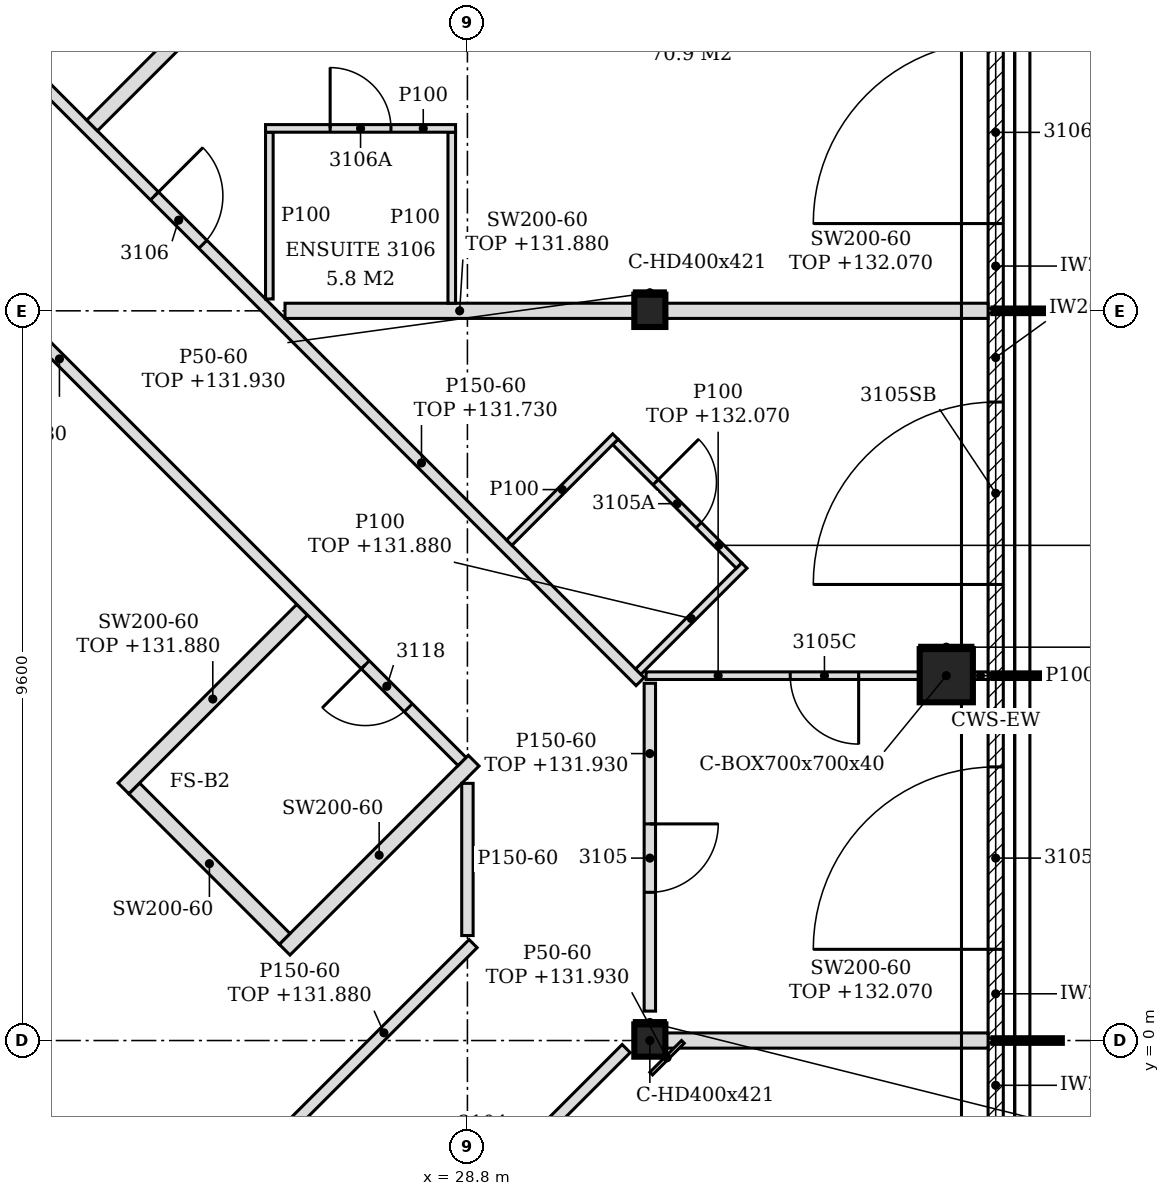
"""IFC4 building model, lengths in metres.
Left out: names, types, materials, properties, quantities, classifications, styles, units other than length and angle.
Written with IfcOpenShell. Run it as: python <this file> out.ifc"""

import sys

from ifc_helpers import new_model, si_unit, direction, frame, frame_2d, origin, origin_2d, place, context, subcontext, project, spatial, polyline, rectangle, hollow_rectangle, i_section, outline, extrude, element, fill, save


model = new_model("IFC4")
c1 = context("Model", 3, precision=1e-05, world=origin(), true_north=direction((0.0, 1.0)))
c2 = subcontext(c1, "Body", "Model", "MODEL_VIEW")
j1 = project(units=[si_unit("LENGTHUNIT", "METRE"), si_unit("PLANEANGLEUNIT", "RADIAN")], contexts=[c1])
p1 = place(None, origin())
s1 = spatial("IfcSite", under=j1, at=p1, CompositionType="ELEMENT")
p2 = place(p1, origin())
s2 = spatial("IfcBuilding", under=s1, at=p2, CompositionType="ELEMENT")
p3 = place(p2, frame((0.0, 0.0, 129.0)))
s3 = spatial("IfcBuildingStorey", under=s2, at=p3, CompositionType="ELEMENT", Elevation=129.0)
p4 = place(p3, frame((35.1, 4.8, -0.15), z_axis=(0.0, 0.0, 1.0), x_axis=(1.0, 0.0, 0.0)))
e1 = element("IfcColumn", 1, at=p4, inside=s3, PredefinedType="COLUMN", context=c2, shape_type="SweptSolid", body=[
    extrude(hollow_rectangle(XDim=0.7, YDim=0.7, WallThickness=0.04, at=origin_2d()), origin(), (0.0, 0.0, 1.0), 3.6),
])
for number, where, z_axis, x_axis in (
    (2, (31.2, 0.0, -0.15), (0.0, 0.0, 1.0), (1.0, 0.0, 0.0)),
    (3, (31.2, 9.6, -0.15), (0.0, 0.0, 1.0), (1.0, 0.0, 0.0)),
):
    element("IfcColumn", number, at=place(p3, frame(where, z_axis=z_axis, x_axis=x_axis)), inside=s3, PredefinedType="COLUMN", context=c2, shape_type="SweptSolid", body=[
        extrude(i_section(OverallWidth=0.409, OverallDepth=0.425, WebThickness=0.033, FlangeThickness=0.052, FilletRadius=0.015, at=origin_2d()), origin(), (0.0, 0.0, 1.0), 3.6),
    ])
p5 = place(p3, frame((35.75, -4.656, 0.0), z_axis=(0.0, 0.0, 1.0), x_axis=(0.0, 1.0, 0.0)))
e4 = element("IfcWall", 4, at=p5, inside=s3, PredefinedType="NOTDEFINED", context=c2, shape_type="SweptSolid", body=[
    extrude(rectangle(XDim=4.626, YDim=0.2, at=frame_2d((2.313, 0.0))), origin(), (0.0, 0.0, 1.0), 3.45),
])
p6 = place(p5, frame((1.108, 0.0, 0.0)))
e5 = element("IfcOpeningElement", 5, at=p6, cuts=e4, PredefinedType="OPENING", context=c2, shape_type="SweptSolid", body=[
    extrude(rectangle(XDim=2.4, YDim=2.4, at=frame_2d((1.2, 1.2))), frame((0.0, 0.11, 0.0), z_axis=(0.0, -1.0, 0.0), x_axis=(1.0, 0.0, 0.0)), (0.0, 0.0, 1.0), 0.22),
])
p7 = place(p3, frame((35.75, 0.03, 0.0), z_axis=(0.0, 0.0, 1.0), x_axis=(0.0, 1.0, 0.0)))
e6 = element("IfcWall", 6, at=p7, inside=s3, PredefinedType="NOTDEFINED", context=c2, shape_type="SweptSolid", body=[
    extrude(rectangle(XDim=4.74, YDim=0.2, at=frame_2d((2.37, 0.0))), origin(), (0.0, 0.0, 1.0), 3.45),
])
p8 = place(p7, frame((1.17, 0.0, 0.0)))
e7 = element("IfcOpeningElement", 7, at=p8, cuts=e6, PredefinedType="OPENING", context=c2, shape_type="SweptSolid", body=[
    extrude(rectangle(XDim=2.4, YDim=2.4, at=frame_2d((1.2, 1.2))), frame((0.0, 0.11, 0.0), z_axis=(0.0, -1.0, 0.0), x_axis=(1.0, 0.0, 0.0)), (0.0, 0.0, 1.0), 0.22),
])
p9 = place(p3, frame((35.75, 4.83, 0.0), z_axis=(0.0, 0.0, 1.0), x_axis=(0.0, 1.0, 0.0)))
e8 = element("IfcWall", 8, at=p9, inside=s3, PredefinedType="NOTDEFINED", context=c2, shape_type="SweptSolid", body=[
    extrude(rectangle(XDim=4.74, YDim=0.2, at=frame_2d((2.37, 0.0))), origin(), (0.0, 0.0, 1.0), 3.45),
])
p10 = place(p9, frame((1.17, 0.0, 0.0)))
e9 = element("IfcOpeningElement", 9, at=p10, cuts=e8, PredefinedType="OPENING", context=c2, shape_type="SweptSolid", body=[
    extrude(rectangle(XDim=2.4, YDim=2.4, at=frame_2d((1.2, 1.2))), frame((0.0, 0.11, 0.0), z_axis=(0.0, -1.0, 0.0), x_axis=(1.0, 0.0, 0.0)), (0.0, 0.0, 1.0), 0.22),
])
p11 = place(p3, frame((35.75, 9.63, 0.0), z_axis=(0.0, 0.0, 1.0), x_axis=(0.0, 1.0, 0.0)))
e10 = element("IfcWall", 10, at=p11, inside=s3, PredefinedType="NOTDEFINED", context=c2, shape_type="SweptSolid", body=[
    extrude(rectangle(XDim=4.626, YDim=0.2, at=frame_2d((2.313, 0.0))), origin(), (0.0, 0.0, 1.0), 3.45),
])
p12 = place(p11, frame((1.118, 0.0, 0.0)))
e11 = element("IfcOpeningElement", 11, at=p12, cuts=e10, PredefinedType="OPENING", context=c2, shape_type="SweptSolid", body=[
    extrude(rectangle(XDim=2.4, YDim=2.4, at=frame_2d((1.2, 1.2))), frame((0.0, 0.11, 0.0), z_axis=(0.0, -1.0, 0.0), x_axis=(1.0, 0.0, 0.0)), (0.0, 0.0, 1.0), 0.22),
])
p13 = place(p3, frame((22.722, -8.272, 0.0), z_axis=(0.0, 0.0, 1.0), x_axis=(0.707106781187, 0.707106781187, 0.0)))
e12 = element("IfcWall", 12, at=p13, inside=s3, PredefinedType="PARTITIONING", context=c2, shape_type="SweptSolid", body=[
    extrude(rectangle(XDim=11.549, YDim=0.15, at=frame_2d((5.774, 0.0))), origin(), (0.0, 0.0, 1.0), 2.88),
])
p14 = place(p13, frame((1.925, 0.0, 0.0)))
e13 = element("IfcOpeningElement", 13, at=p14, cuts=e12, PredefinedType="OPENING", context=c2, shape_type="SweptSolid", body=[
    extrude(rectangle(XDim=0.9, YDim=2.1, at=frame_2d((0.45, 1.05))), frame((0.0, 0.085, 0.0), z_axis=(0.0, -1.0, 0.0), x_axis=(1.0, 0.0, 0.0)), (0.0, 0.0, 1.0), 0.17),
])
p15 = place(p13, frame((9.065, 0.0, 0.0)))
e14 = element("IfcOpeningElement", 14, at=p15, cuts=e12, PredefinedType="OPENING", context=c2, shape_type="SweptSolid", body=[
    extrude(rectangle(XDim=0.9, YDim=2.1, at=frame_2d((0.45, 1.05))), frame((0.0, 0.085, 0.0), z_axis=(0.0, -1.0, 0.0), x_axis=(1.0, 0.0, 0.0)), (0.0, 0.0, 1.0), 0.17),
])
p16 = place(p3, frame((26.528, -1.072, 0.0), z_axis=(0.0, 0.0, 1.0), x_axis=(0.707106781187, 0.707106781187, 0.0)))
e15 = element("IfcWall", 15, at=p16, inside=s3, PredefinedType="PARTITIONING", context=c2, shape_type="SweptSolid", body=[
    extrude(rectangle(XDim=3.319, YDim=0.15, at=frame_2d((1.66, 0.0))), origin(), (0.0, 0.0, 1.0), 2.88),
])
p17 = place(p3, frame((31.405, 0.0, 0.0), z_axis=(0.0, 0.0, 1.0), x_axis=(1.0, 0.0, 0.0)))
e16 = element("IfcWall", 16, at=p17, inside=s3, PredefinedType="PARTITIONING", context=c2, shape_type="SweptSolid", body=[
    extrude(outline(polyline([(0.0, 0.0), (4.245, 0.0), (4.246, 3.07), (3.845, 3.07), (3.844, 2.93), (3.545, 2.93), (3.543, 3.07), (0.0, 3.07), (0.0, 0.0)])), frame((0.0, 0.1, 0.0), z_axis=(0.0, -1.0, 0.0), x_axis=(1.0, 0.0, 0.0)), (0.0, 0.0, 1.0), 0.2),
])
p18 = place(p3, frame((31.2, 0.387, 0.0), z_axis=(0.0, 0.0, 1.0), x_axis=(0.0, 1.0, 0.0)))
e17 = element("IfcWall", 17, at=p18, inside=s3, PredefinedType="PARTITIONING", context=c2, shape_type="SweptSolid", body=[
    extrude(rectangle(XDim=4.313, YDim=0.15, at=frame_2d((2.156, 0.0))), origin(), (0.0, 0.0, 1.0), 2.93),
])
p19 = place(p18, frame((1.563, 0.0, 0.0)))
e18 = element("IfcOpeningElement", 18, at=p19, cuts=e17, PredefinedType="OPENING", context=c2, shape_type="SweptSolid", body=[
    extrude(rectangle(XDim=0.9, YDim=2.1, at=frame_2d((0.45, 1.05))), frame((0.0, 0.085, 0.0), z_axis=(0.0, -1.0, 0.0), x_axis=(1.0, 0.0, 0.0)), (0.0, 0.0, 1.0), 0.17),
])
p20 = place(p3, frame((26.395, 1.195, 0.0), z_axis=(0.0, 0.0, 1.0), x_axis=(0.707106781187, 0.707106781187, 0.0)))
e19 = element("IfcWall", 19, at=p20, inside=s3, PredefinedType="PARTITIONING", context=c2, shape_type="SweptSolid", body=[
    extrude(rectangle(XDim=3.517, YDim=0.2, at=frame_2d((1.759, 0.0))), origin(), (0.0, 0.0, 1.0), 3.45),
])
p21 = place(p3, frame((26.395, 1.337, 0.0), z_axis=(0.0, 0.0, 1.0), x_axis=(-0.706888787312, 0.707324707876, 0.0)))
e20 = element("IfcWall", 20, at=p21, inside=s3, PredefinedType="PARTITIONING", context=c2, shape_type="SweptSolid", body=[
    extrude(rectangle(XDim=2.8, YDim=0.2, at=frame_2d((1.4, 0.0))), origin(), (0.0, 0.0, 1.0), 3.45),
])
p22 = place(p3, frame((28.8, 1.381, 0.0), z_axis=(0.0, 0.0, 1.0), x_axis=(0.0, 1.0, 0.0)))
e21 = element("IfcWall", 21, at=p22, inside=s3, PredefinedType="PARTITIONING", context=c2, shape_type="SweptSolid", body=[
    extrude(rectangle(XDim=2.002, YDim=0.15, at=frame_2d((1.001, 0.0))), origin(), (0.0, 0.0, 1.0), 3.45),
])
p23 = place(p3, frame((24.274, 3.317, 0.0), z_axis=(0.0, 0.0, 1.0), x_axis=(0.707253620925, 0.706959910949, 0.0)))
e22 = element("IfcWall", 22, at=p23, inside=s3, PredefinedType="PARTITIONING", context=c2, shape_type="SweptSolid", body=[
    extrude(rectangle(XDim=3.325, YDim=0.2, at=frame_2d((1.663, 0.0))), origin(), (0.0, 0.0, 1.0), 2.88),
])
p24 = place(p3, frame((28.729, 3.671, 0.0), z_axis=(0.0, 0.0, 1.0), x_axis=(-0.707106781187, 0.707106781187, 0.0)))
e23 = element("IfcWall", 23, at=p24, inside=s3, PredefinedType="PARTITIONING", context=c2, shape_type="SweptSolid", body=[
    extrude(rectangle(XDim=13.182, YDim=0.15, at=frame_2d((6.591, 0.0))), origin(), (0.0, 0.0, 1.0), 2.88),
])
p25 = place(p24, frame((1.0, 0.0, 0.0)))
e24 = element("IfcOpeningElement", 24, at=p25, cuts=e23, PredefinedType="OPENING", context=c2, shape_type="SweptSolid", body=[
    extrude(rectangle(XDim=0.8, YDim=2.1, at=frame_2d((0.4, 1.05))), frame((0.0, 0.085, 0.0), z_axis=(0.0, -1.0, 0.0), x_axis=(1.0, 0.0, 0.0)), (0.0, 0.0, 1.0), 0.17),
])
p26 = place(p3, frame((31.072, 4.722, 0.0), z_axis=(0.0, 0.0, 1.0), x_axis=(-0.707106781187, 0.707106781187, 0.0)))
e25 = element("IfcWall", 25, at=p26, inside=s3, PredefinedType="PARTITIONING", context=c2, shape_type="SweptSolid", body=[
    extrude(rectangle(XDim=23.688, YDim=0.15, at=frame_2d((11.844, 0.0))), origin(), (0.0, 0.0, 1.0), 2.73),
])
p27 = place(p26, frame((8.135, 0.0, 0.0)))
e26 = element("IfcOpeningElement", 26, at=p27, cuts=e25, PredefinedType="OPENING", context=c2, shape_type="SweptSolid", body=[
    extrude(rectangle(XDim=0.9, YDim=2.1, at=frame_2d((0.45, 1.05))), frame((0.0, 0.085, 0.0), z_axis=(0.0, -1.0, 0.0), x_axis=(1.0, 0.0, 0.0)), (0.0, 0.0, 1.0), 0.17),
])
p28 = place(p26, frame((13.091, 0.0, 0.0)))
e27 = element("IfcOpeningElement", 27, at=p28, cuts=e25, PredefinedType="OPENING", context=c2, shape_type="SweptSolid", body=[
    extrude(rectangle(XDim=0.9, YDim=2.1, at=frame_2d((0.45, 1.05))), frame((0.0, 0.085, 0.0), z_axis=(0.0, -1.0, 0.0), x_axis=(1.0, 0.0, 0.0)), (0.0, 0.0, 1.0), 0.17),
])
p29 = place(p26, frame((18.69, 0.0, 0.0)))
e28 = element("IfcOpeningElement", 28, at=p29, cuts=e25, PredefinedType="OPENING", context=c2, shape_type="SweptSolid", body=[
    extrude(rectangle(XDim=0.9, YDim=2.1, at=frame_2d((0.45, 1.05))), frame((0.0, 0.085, 0.0), z_axis=(0.0, -1.0, 0.0), x_axis=(1.0, 0.0, 0.0)), (0.0, 0.0, 1.0), 0.17),
])
p30 = place(p3, frame((31.15, 4.8, 0.0), z_axis=(0.0, 0.0, 1.0), x_axis=(1.0, 0.0, 0.0)))
e29 = element("IfcWall", 29, at=p30, inside=s3, PredefinedType="PARTITIONING", context=c2, shape_type="SweptSolid", body=[
    extrude(outline(polyline([(0.0, 0.0), (3.6, 0.0), (3.6, 3.07), (0.2, 3.07), (0.198, 2.93), (0.0, 2.93), (0.0, 0.0)])), frame((0.0, 0.05, 0.0), z_axis=(0.0, -1.0, 0.0), x_axis=(1.0, 0.0, 0.0)), (0.0, 0.0, 1.0), 0.1),
])
p31 = place(p30, frame((1.897, 0.0, 0.0)))
e30 = element("IfcOpeningElement", 30, at=p31, cuts=e29, PredefinedType="OPENING", context=c2, shape_type="SweptSolid", body=[
    extrude(rectangle(XDim=0.9, YDim=2.1, at=frame_2d((0.45, 1.05))), frame((0.0, 0.06, 0.0), z_axis=(0.0, -1.0, 0.0), x_axis=(1.0, 0.0, 0.0)), (0.0, 0.0, 1.0), 0.12),
])
p32 = place(p3, frame((35.45, 4.8, 0.0), z_axis=(0.0, 0.0, 1.0), x_axis=(1.0, 0.0, 0.0)))
e31 = element("IfcWall", 31, at=p32, inside=s3, PredefinedType="PARTITIONING", context=c2, shape_type="SweptSolid", body=[
    extrude(rectangle(XDim=0.2, YDim=0.1, at=frame_2d((0.1, 0.0))), origin(), (0.0, 0.0, 1.0), 3.45),
])
p33 = place(p3, frame((31.047, 4.853, 0.0), z_axis=(0.0, 0.0, 1.0), x_axis=(0.707044963048, 0.707168593921, 0.0)))
e32 = element("IfcWall", 32, at=p33, inside=s3, PredefinedType="PARTITIONING", context=c2, shape_type="SweptSolid", body=[
    extrude(rectangle(XDim=1.975, YDim=0.1, at=frame_2d((0.987, 0.0))), origin(), (0.0, 0.0, 1.0), 2.88),
])
p34 = place(p3, frame((32.373, 6.25, 0.0), z_axis=(0.0, 0.0, 1.0), x_axis=(-0.707159861304, 0.707053697085, 0.0)))
e33 = element("IfcWall", 33, at=p34, inside=s3, PredefinedType="PARTITIONING", context=c2, shape_type="SweptSolid", body=[
    extrude(rectangle(XDim=2.3, YDim=0.1, at=frame_2d((1.15, 0.0))), origin(), (0.0, 0.0, 1.0), 2.93),
])
p35 = place(p34, frame((0.75, 0.0, 0.0)))
e34 = element("IfcOpeningElement", 34, at=p35, cuts=e33, PredefinedType="OPENING", context=c2, shape_type="SweptSolid", body=[
    extrude(rectangle(XDim=0.8, YDim=2.1, at=frame_2d((0.4, 1.05))), frame((0.0, 0.06, 0.0), z_axis=(0.0, -1.0, 0.0), x_axis=(1.0, 0.0, 0.0)), (0.0, 0.0, 1.0), 0.12),
])
p36 = place(p3, frame((29.35, 6.55, 0.0), z_axis=(0.0, 0.0, 1.0), x_axis=(0.707106781187, 0.707106781187, 0.0)))
e35 = element("IfcWall", 35, at=p36, inside=s3, PredefinedType="PARTITIONING", context=c2, shape_type="SweptSolid", body=[
    extrude(rectangle(XDim=1.975, YDim=0.1, at=frame_2d((0.987, 0.0))), origin(), (0.0, 0.0, 1.0), 3.45),
])
p37 = place(p3, frame((26.4, 9.6, 0.0), z_axis=(0.0, 0.0, 1.0), x_axis=(1.0, 0.0, 0.0)))
e36 = element("IfcWall", 36, at=p37, inside=s3, PredefinedType="PARTITIONING", context=c2, shape_type="SweptSolid", body=[
    extrude(rectangle(XDim=4.595, YDim=0.2, at=frame_2d((2.298, 0.0))), origin(), (0.0, 0.0, 1.0), 2.88),
])
p38 = place(p3, frame((31.405, 9.6, 0.0), z_axis=(0.0, 0.0, 1.0), x_axis=(1.0, 0.0, 0.0)))
e37 = element("IfcWall", 37, at=p38, inside=s3, PredefinedType="PARTITIONING", context=c2, shape_type="SweptSolid", body=[
    extrude(outline(polyline([(0.0, 0.0), (4.245, 0.0), (4.246, 3.07), (3.845, 3.07), (3.844, 2.93), (3.545, 2.93), (3.543, 3.07), (0.0, 3.07), (0.0, 0.0)])), frame((0.0, 0.1, 0.0), z_axis=(0.0, -1.0, 0.0), x_axis=(1.0, 0.0, 0.0)), (0.0, 0.0, 1.0), 0.2),
])
p39 = place(p3, frame((28.594, 9.7, 0.0), z_axis=(0.0, 0.0, 1.0), x_axis=(0.0, 1.0, 0.0)))
e38 = element("IfcWall", 38, at=p39, inside=s3, PredefinedType="PARTITIONING", context=c2, shape_type="SweptSolid", body=[
    extrude(outline(polyline([(0.0, 0.0), (2.25, 0.0), (2.25, 3.45), (0.005, 3.45), (0.003, 2.88), (0.0, 2.88), (0.0, 0.0)])), frame((0.0, 0.05, 0.0), z_axis=(0.0, -1.0, 0.0), x_axis=(1.0, 0.0, 0.0)), (0.0, 0.0, 1.0), 0.1),
])
p40 = place(p3, frame((26.194, 9.756, 0.0), z_axis=(0.0, 0.0, 1.0), x_axis=(0.0, 1.0, 0.0)))
e39 = element("IfcWall", 39, at=p40, inside=s3, PredefinedType="PARTITIONING", context=c2, shape_type="SweptSolid", body=[
    extrude(rectangle(XDim=2.194, YDim=0.1, at=frame_2d((1.097, 0.0))), origin(), (0.0, 0.0, 1.0), 3.45),
])
p41 = place(p3, frame((23.862, 12.038, 0.0), z_axis=(0.0, 0.0, 1.0), x_axis=(0.707106781187, 0.707106781187, 0.0)))
e40 = element("IfcWall", 40, at=p41, inside=s3, PredefinedType="PARTITIONING", context=c2, shape_type="SweptSolid", body=[
    extrude(rectangle(XDim=8.858, YDim=0.2, at=frame_2d((4.429, 0.0))), origin(), (0.0, 0.0, 1.0), 2.88),
])
p42 = place(p3, frame((26.144, 12.0, 0.0), z_axis=(0.0, 0.0, 1.0), x_axis=(1.0, 0.0, 0.0)))
e41 = element("IfcWall", 41, at=p42, inside=s3, PredefinedType="PARTITIONING", context=c2, shape_type="SweptSolid", body=[
    extrude(rectangle(XDim=2.5, YDim=0.1, at=frame_2d((1.25, 0.0))), origin(), (0.0, 0.0, 1.0), 3.45),
])
p43 = place(p42, frame((0.85, 0.0, 0.0)))
e42 = element("IfcOpeningElement", 42, at=p43, cuts=e41, PredefinedType="OPENING", context=c2, shape_type="SweptSolid", body=[
    extrude(rectangle(XDim=0.8, YDim=2.1, at=frame_2d((0.4, 1.05))), frame((0.0, 0.06, 0.0), z_axis=(0.0, -1.0, 0.0), x_axis=(1.0, 0.0, 0.0)), (0.0, 0.0, 1.0), 0.12),
])
p44 = place(p3, frame((31.218, -0.435, 0.0), z_axis=(0.0, 0.0, 1.0), x_axis=(0.706899813022, 0.70731368879, 0.0)))
e43 = element("IfcWall", 43, at=p44, inside=s3, PredefinedType="PARTITIONING", context=c2, shape_type="SweptSolid", body=[
    extrude(rectangle(XDim=0.59, YDim=0.05, at=frame_2d((0.295, 0.0))), origin(), (0.0, 0.0, 1.0), 2.93),
])
p45 = place(p3, frame((30.996, 0.238, 0.0), z_axis=(0.0, 0.0, 1.0), x_axis=(1.0, 0.0, 0.0)))
e44 = element("IfcWall", 44, at=p45, inside=s3, PredefinedType="PARTITIONING", context=c2, shape_type="SweptSolid", body=[
    extrude(rectangle(XDim=0.409, YDim=0.05, at=frame_2d((0.205, 0.0))), origin(), (0.0, 0.0, 1.0), 2.93),
])
p46 = place(p3, frame((34.75, 5.175, 0.0), z_axis=(0.0, 0.0, 1.0), x_axis=(1.0, 0.0, 0.0)))
e45 = element("IfcWall", 45, at=p46, inside=s3, PredefinedType="PARTITIONING", context=c2, shape_type="SweptSolid", body=[
    extrude(rectangle(XDim=0.7, YDim=0.05, at=frame_2d((0.35, 0.0))), origin(), (0.0, 0.0, 1.0), 2.93),
])
p47 = place(p3, frame((30.996, 9.837, 0.0), z_axis=(0.0, 0.0, 1.0), x_axis=(1.0, 0.0, 0.0)))
e46 = element("IfcWall", 46, at=p47, inside=s3, PredefinedType="PARTITIONING", context=c2, shape_type="SweptSolid", body=[
    extrude(rectangle(XDim=0.409, YDim=0.05, at=frame_2d((0.205, 0.0))), origin(), (0.0, 0.0, 1.0), 2.93),
])
p48 = place(p8, origin())
e47 = element("IfcDoor", 47, at=p48, inside=s3, OperationType="SINGLE_SWING_LEFT", PredefinedType="DOOR", context=c2, shape_type="SweptSolid", body=[
    extrude(rectangle(XDim=2.4, YDim=2.4, at=frame_2d((1.2, 1.2))), frame((0.0, 0.025, 0.0), z_axis=(0.0, -1.0, 0.0), x_axis=(1.0, 0.0, 0.0)), (0.0, 0.0, 1.0), 0.05),
])
fill(e7, e47)
p49 = place(p10, origin())
e48 = element("IfcDoor", 48, at=p49, inside=s3, OperationType="SINGLE_SWING_LEFT", PredefinedType="DOOR", context=c2, shape_type="SweptSolid", body=[
    extrude(rectangle(XDim=2.4, YDim=2.4, at=frame_2d((1.2, 1.2))), frame((0.0, 0.025, 0.0), z_axis=(0.0, -1.0, 0.0), x_axis=(1.0, 0.0, 0.0)), (0.0, 0.0, 1.0), 0.05),
])
fill(e9, e48)
p50 = place(p12, origin())
e49 = element("IfcDoor", 49, at=p50, inside=s3, OperationType="SINGLE_SWING_LEFT", PredefinedType="DOOR", context=c2, shape_type="SweptSolid", body=[
    extrude(rectangle(XDim=2.4, YDim=2.4, at=frame_2d((1.2, 1.2))), frame((0.0, 0.025, 0.0), z_axis=(0.0, -1.0, 0.0), x_axis=(1.0, 0.0, 0.0)), (0.0, 0.0, 1.0), 0.05),
])
fill(e11, e49)
p51 = place(p19, frame((0.9, 0.0, 0.0), z_axis=(0.0, 0.0, 1.0), x_axis=(-1.0, 0.0, 0.0)))
e50 = element("IfcDoor", 50, at=p51, inside=s3, OperationType="SINGLE_SWING_LEFT", PredefinedType="DOOR", context=c2, shape_type="SweptSolid", body=[
    extrude(rectangle(XDim=0.9, YDim=2.1, at=frame_2d((0.45, 1.05))), frame((0.0, 0.025, 0.0), z_axis=(0.0, -1.0, 0.0), x_axis=(1.0, 0.0, 0.0)), (0.0, 0.0, 1.0), 0.05),
])
fill(e18, e50)
p52 = place(p31, frame((0.9, 0.0, 0.0), z_axis=(0.0, 0.0, 1.0), x_axis=(-1.0, 0.0, 0.0)))
e51 = element("IfcDoor", 51, at=p52, inside=s3, OperationType="SINGLE_SWING_LEFT", PredefinedType="DOOR", context=c2, shape_type="SweptSolid", body=[
    extrude(rectangle(XDim=0.9, YDim=2.1, at=frame_2d((0.45, 1.05))), frame((0.0, 0.025, 0.0), z_axis=(0.0, -1.0, 0.0), x_axis=(1.0, 0.0, 0.0)), (0.0, 0.0, 1.0), 0.05),
])
fill(e30, e51)
p53 = place(p35, frame((0.8, 0.0, 0.0), z_axis=(0.0, 0.0, 1.0), x_axis=(-1.0, 0.0, 0.0)))
e52 = element("IfcDoor", 52, at=p53, inside=s3, OperationType="SINGLE_SWING_LEFT", PredefinedType="DOOR", context=c2, shape_type="SweptSolid", body=[
    extrude(rectangle(XDim=0.8, YDim=2.1, at=frame_2d((0.4, 1.05))), frame((0.0, 0.025, 0.0), z_axis=(0.0, -1.0, 0.0), x_axis=(1.0, 0.0, 0.0)), (0.0, 0.0, 1.0), 0.05),
])
fill(e34, e52)
p54 = place(p27, frame((0.9, 0.0, 0.0), z_axis=(0.0, 0.0, 1.0), x_axis=(-1.0, 0.0, 0.0)))
e53 = element("IfcDoor", 53, at=p54, inside=s3, OperationType="SINGLE_SWING_LEFT", PredefinedType="DOOR", context=c2, shape_type="SweptSolid", body=[
    extrude(rectangle(XDim=0.9, YDim=2.1, at=frame_2d((0.45, 1.05))), frame((0.0, 0.025, 0.0), z_axis=(0.0, -1.0, 0.0), x_axis=(1.0, 0.0, 0.0)), (0.0, 0.0, 1.0), 0.05),
])
fill(e26, e53)
p55 = place(p43, origin())
e54 = element("IfcDoor", 54, at=p55, inside=s3, OperationType="SINGLE_SWING_LEFT", PredefinedType="DOOR", context=c2, shape_type="SweptSolid", body=[
    extrude(rectangle(XDim=0.8, YDim=2.1, at=frame_2d((0.4, 1.05))), frame((0.0, 0.025, 0.0), z_axis=(0.0, -1.0, 0.0), x_axis=(1.0, 0.0, 0.0)), (0.0, 0.0, 1.0), 0.05),
])
fill(e42, e54)
p56 = place(p25, origin())
e55 = element("IfcDoor", 55, at=p56, inside=s3, OperationType="SINGLE_SWING_RIGHT", PredefinedType="DOOR", context=c2, shape_type="SweptSolid", body=[
    extrude(rectangle(XDim=0.8, YDim=2.1, at=frame_2d((0.4, 1.05))), frame((0.0, 0.025, 0.0), z_axis=(0.0, -1.0, 0.0), x_axis=(1.0, 0.0, 0.0)), (0.0, 0.0, 1.0), 0.05),
])
fill(e24, e55)
save(model, sys.argv[1])
